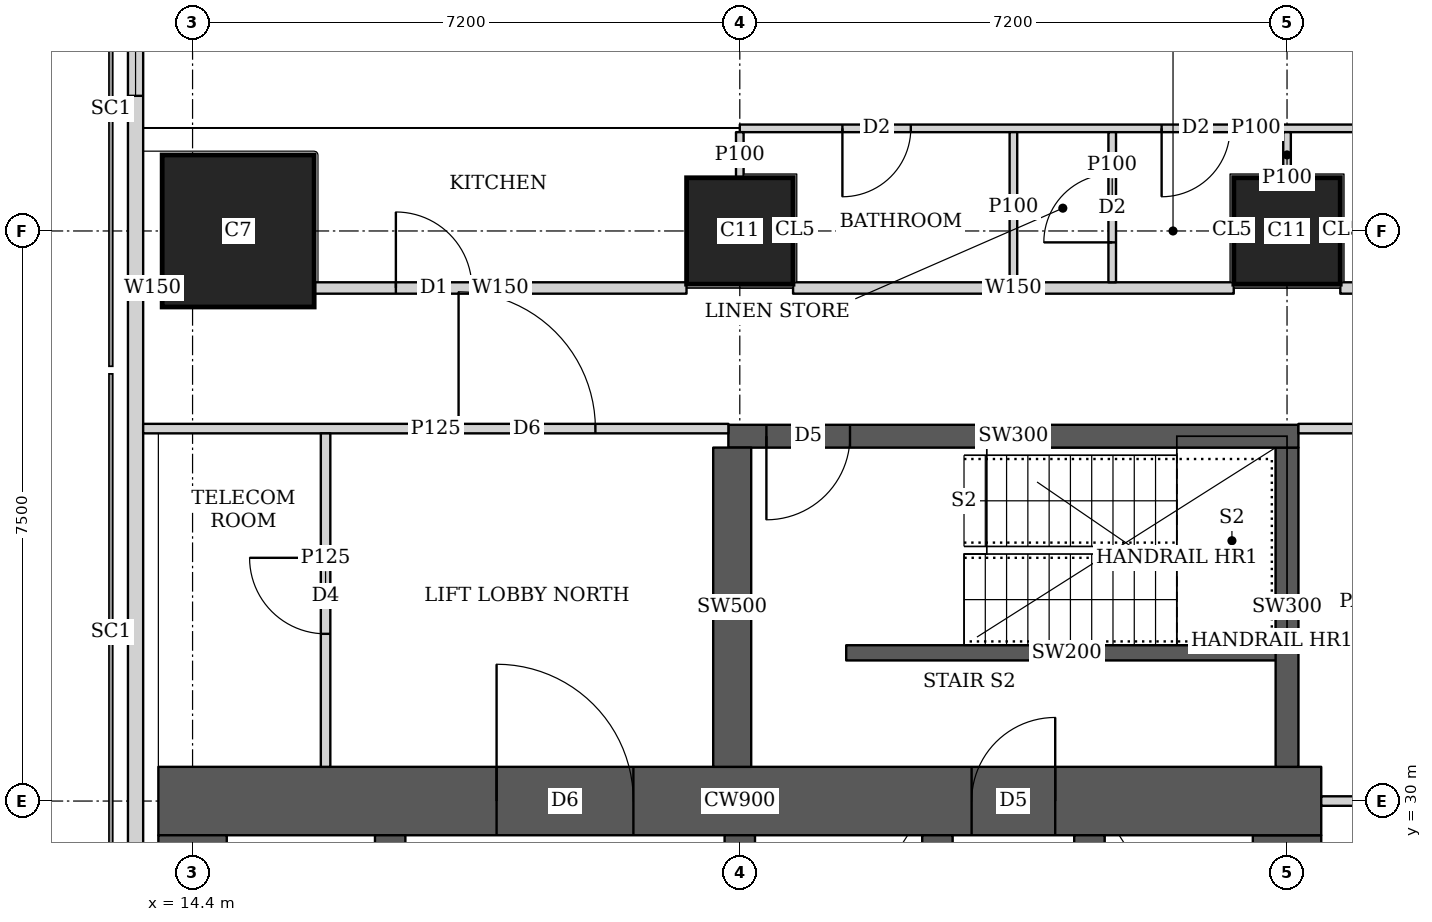
"""IFC4 building model, lengths in metres.
Left out: names, types, materials, properties, quantities, classifications, styles, units other than length and angle.
Written with IfcOpenShell. Run it as: python <this file> out.ifc"""

import sys

from ifc_helpers import new_model, si_unit, direction, frame, frame_2d, origin, origin_2d, place, context, subcontext, project, spatial, rectangle, extrude, element, fill, save


model = new_model("IFC4")
c1 = context("Model", 3, precision=1e-05, world=origin(), true_north=direction((0.0, 1.0)))
c2 = subcontext(c1, "Body", "Model", "MODEL_VIEW")
j1 = project(units=[si_unit("LENGTHUNIT", "METRE"), si_unit("PLANEANGLEUNIT", "RADIAN")], contexts=[c1])
p1 = place(None, origin())
s1 = spatial("IfcSite", under=j1, at=p1, CompositionType="ELEMENT")
p2 = place(p1, origin())
s2 = spatial("IfcBuilding", under=s1, at=p2, CompositionType="ELEMENT")
p3 = place(p2, frame((0.0, 0.0, 270.35)))
s3 = spatial("IfcBuildingStorey", under=s2, at=p3, CompositionType="ELEMENT", Elevation=270.35)
p4 = place(p3, frame((15.0, 37.5, 0.0), z_axis=(0.0, 0.0, 1.0), x_axis=(1.0, 0.0, 0.0)))
e1 = element("IfcColumn", 1, at=p4, inside=s3, PredefinedType="COLUMN", context=c2, shape_type="SweptSolid", body=[
    extrude(rectangle(XDim=2.0, YDim=2.0, at=origin_2d()), origin(), (0.0, 0.0, 1.0), 3.75),
])
for number, where, z_axis, x_axis in (
    (2, (21.6, 37.5, 0.0), (0.0, 0.0, 1.0), (1.0, 0.0, 0.0)),
    (3, (28.8, 37.5, 0.0), (0.0, 0.0, 1.0), (1.0, 0.0, 0.0)),
):
    element("IfcColumn", number, at=place(p3, frame(where, z_axis=z_axis, x_axis=x_axis)), inside=s3, PredefinedType="COLUMN", context=c2, shape_type="SweptSolid", body=[
        extrude(rectangle(XDim=1.4, YDim=1.4, at=origin_2d()), origin(), (0.0, 0.0, 1.0), 3.75),
    ])
p5 = place(p3, frame((13.95, 30.0, 0.0), z_axis=(0.0, 0.0, 1.0), x_axis=(1.0, 0.0, 0.0)))
e4 = element("IfcWall", 4, at=p5, inside=s3, PredefinedType="SHEAR", context=c2, shape_type="SweptSolid", body=[
    extrude(rectangle(XDim=15.3, YDim=0.9, at=frame_2d((7.65, 0.0))), origin(), (0.0, 0.0, 1.0), 3.75),
])
p6 = place(p5, frame((4.45, 0.0, 0.0)))
e5 = element("IfcOpeningElement", 5, at=p6, cuts=e4, PredefinedType="OPENING", context=c2, shape_type="SweptSolid", body=[
    extrude(rectangle(XDim=1.8, YDim=2.1, at=frame_2d((0.9, 1.05))), frame((0.0, 0.46, 0.0), z_axis=(0.0, -1.0, 0.0), x_axis=(1.0, 0.0, 0.0)), (0.0, 0.0, 1.0), 0.92),
])
p7 = place(p5, frame((10.7, 0.0, 0.0)))
e6 = element("IfcOpeningElement", 6, at=p7, cuts=e4, PredefinedType="OPENING", context=c2, shape_type="SweptSolid", body=[
    extrude(rectangle(XDim=1.1, YDim=2.1, at=frame_2d((0.55, 1.05))), frame((0.0, 0.46, 0.0), z_axis=(0.0, -1.0, 0.0), x_axis=(1.0, 0.0, 0.0)), (0.0, 0.0, 1.0), 0.92),
])
for number, where, z_axis, x_axis in (
    (7, (14.4, 15.45, 0.0), (0.0, 0.0, 1.0), (0.0, 1.0, 0.0)),
    (8, (28.8, 15.45, 0.0), (0.0, 0.0, 1.0), (0.0, 1.0, 0.0)),
):
    element("IfcWall", number, at=place(p3, frame(where, z_axis=z_axis, x_axis=x_axis)), inside=s3, PredefinedType="SHEAR", context=c2, shape_type="SweptSolid", body=[
        extrude(rectangle(XDim=14.1, YDim=0.9, at=frame_2d((7.05, 0.0))), origin(), (0.0, 0.0, 1.0), 3.75),
    ])
p8 = place(p3, frame((17.0, 15.45, 0.0), z_axis=(0.0, 0.0, 1.0), x_axis=(0.0, 1.0, 0.0)))
e9 = element("IfcWall", 9, at=p8, inside=s3, PredefinedType="SHEAR", context=c2, shape_type="SweptSolid", body=[
    extrude(rectangle(XDim=14.1, YDim=0.4, at=frame_2d((7.05, 0.0))), origin(), (0.0, 0.0, 1.0), 3.75),
])
p9 = place(p8, frame((1.05, 0.0, 0.0)))
e10 = element("IfcOpeningElement", 10, at=p9, cuts=e9, PredefinedType="OPENING", context=c2, shape_type="SweptSolid", body=[
    extrude(rectangle(XDim=1.0, YDim=2.1, at=frame_2d((0.5, 1.05))), frame((0.0, 0.21, 0.0), z_axis=(0.0, -1.0, 0.0), x_axis=(1.0, 0.0, 0.0)), (0.0, 0.0, 1.0), 0.42),
])
p10 = place(p8, frame((4.675, 0.0, 0.0)))
e11 = element("IfcOpeningElement", 11, at=p10, cuts=e9, PredefinedType="OPENING", context=c2, shape_type="SweptSolid", body=[
    extrude(rectangle(XDim=1.0, YDim=2.1, at=frame_2d((0.5, 1.05))), frame((0.0, 0.21, 0.0), z_axis=(0.0, -1.0, 0.0), x_axis=(1.0, 0.0, 0.0)), (0.0, 0.0, 1.0), 0.42),
])
p11 = place(p8, frame((8.425, 0.0, 0.0)))
e12 = element("IfcOpeningElement", 12, at=p11, cuts=e9, PredefinedType="OPENING", context=c2, shape_type="SweptSolid", body=[
    extrude(rectangle(XDim=1.0, YDim=2.1, at=frame_2d((0.5, 1.05))), frame((0.0, 0.21, 0.0), z_axis=(0.0, -1.0, 0.0), x_axis=(1.0, 0.0, 0.0)), (0.0, 0.0, 1.0), 0.42),
])
p12 = place(p8, frame((12.175, 0.0, 0.0)))
e13 = element("IfcOpeningElement", 13, at=p12, cuts=e9, PredefinedType="OPENING", context=c2, shape_type="SweptSolid", body=[
    extrude(rectangle(XDim=1.0, YDim=2.1, at=frame_2d((0.5, 1.05))), frame((0.0, 0.21, 0.0), z_axis=(0.0, -1.0, 0.0), x_axis=(1.0, 0.0, 0.0)), (0.0, 0.0, 1.0), 0.42),
])
p13 = place(p3, frame((21.6, 15.45, 0.0), z_axis=(0.0, 0.0, 1.0), x_axis=(0.0, 1.0, 0.0)))
e14 = element("IfcWall", 14, at=p13, inside=s3, PredefinedType="SHEAR", context=c2, shape_type="SweptSolid", body=[
    extrude(rectangle(XDim=14.1, YDim=0.4, at=frame_2d((7.05, 0.0))), origin(), (0.0, 0.0, 1.0), 3.75),
])
p14 = place(p13, frame((0.875, 0.0, 0.0)))
e15 = element("IfcOpeningElement", 15, at=p14, cuts=e14, PredefinedType="OPENING", context=c2, shape_type="SweptSolid", body=[
    extrude(rectangle(XDim=1.1, YDim=2.1, at=frame_2d((0.55, 1.05))), frame((0.0, 0.21, 0.0), z_axis=(0.0, -1.0, 0.0), x_axis=(1.0, 0.0, 0.0)), (0.0, 0.0, 1.0), 0.42),
])
p15 = place(p13, frame((4.625, 0.0, 0.0)))
e16 = element("IfcOpeningElement", 16, at=p15, cuts=e14, PredefinedType="OPENING", context=c2, shape_type="SweptSolid", body=[
    extrude(rectangle(XDim=1.1, YDim=2.1, at=frame_2d((0.55, 1.05))), frame((0.0, 0.21, 0.0), z_axis=(0.0, -1.0, 0.0), x_axis=(1.0, 0.0, 0.0)), (0.0, 0.0, 1.0), 0.42),
])
p16 = place(p13, frame((8.375, 0.0, 0.0)))
e17 = element("IfcOpeningElement", 17, at=p16, cuts=e14, PredefinedType="OPENING", context=c2, shape_type="SweptSolid", body=[
    extrude(rectangle(XDim=1.1, YDim=2.1, at=frame_2d((0.55, 1.05))), frame((0.0, 0.21, 0.0), z_axis=(0.0, -1.0, 0.0), x_axis=(1.0, 0.0, 0.0)), (0.0, 0.0, 1.0), 0.42),
])
p17 = place(p13, frame((12.125, 0.0, 0.0)))
e18 = element("IfcOpeningElement", 18, at=p17, cuts=e14, PredefinedType="OPENING", context=c2, shape_type="SweptSolid", body=[
    extrude(rectangle(XDim=1.1, YDim=2.1, at=frame_2d((0.55, 1.05))), frame((0.0, 0.21, 0.0), z_axis=(0.0, -1.0, 0.0), x_axis=(1.0, 0.0, 0.0)), (0.0, 0.0, 1.0), 0.42),
])
p18 = place(p3, frame((24.2, 15.45, 0.0), z_axis=(0.0, 0.0, 1.0), x_axis=(0.0, 1.0, 0.0)))
e19 = element("IfcWall", 19, at=p18, inside=s3, PredefinedType="SHEAR", context=c2, shape_type="SweptSolid", body=[
    extrude(rectangle(XDim=14.1, YDim=0.4, at=frame_2d((7.05, 0.0))), origin(), (0.0, 0.0, 1.0), 3.75),
])
p19 = place(p3, frame((26.2, 26.45, 0.0), z_axis=(0.0, 0.0, 1.0), x_axis=(0.0, 1.0, 0.0)))
e20 = element("IfcWall", 20, at=p19, inside=s3, PredefinedType="SHEAR", context=c2, shape_type="SweptSolid", body=[
    extrude(rectangle(XDim=3.1, YDim=0.4, at=frame_2d((1.55, 0.0))), origin(), (0.0, 0.0, 1.0), 3.75),
])
p20 = place(p19, frame((1.075, 0.0, 0.0)))
e21 = element("IfcOpeningElement", 21, at=p20, cuts=e20, PredefinedType="OPENING", context=c2, shape_type="SweptSolid", body=[
    extrude(rectangle(XDim=1.2, YDim=2.1, at=frame_2d((0.6, 1.05))), frame((0.0, 0.21, 0.0), z_axis=(0.0, -1.0, 0.0), x_axis=(1.0, 0.0, 0.0)), (0.0, 0.0, 1.0), 0.42),
])
p21 = place(p3, frame((21.45, 34.8, 0.0), z_axis=(0.0, 0.0, 1.0), x_axis=(1.0, 0.0, 0.0)))
e22 = element("IfcWall", 22, at=p21, inside=s3, PredefinedType="SHEAR", context=c2, shape_type="SweptSolid", body=[
    extrude(rectangle(XDim=7.5, YDim=0.3, at=frame_2d((3.75, 0.0))), origin(), (0.0, 0.0, 1.0), 3.75),
])
p22 = place(p21, frame((0.5, 0.0, 0.0)))
e23 = element("IfcOpeningElement", 23, at=p22, cuts=e22, PredefinedType="OPENING", context=c2, shape_type="SweptSolid", body=[
    extrude(rectangle(XDim=1.1, YDim=2.1, at=frame_2d((0.55, 1.05))), frame((0.0, 0.16, 0.0), z_axis=(0.0, -1.0, 0.0), x_axis=(1.0, 0.0, 0.0)), (0.0, 0.0, 1.0), 0.32),
])
p23 = place(p3, frame((21.5, 30.45, 0.0), z_axis=(0.0, 0.0, 1.0), x_axis=(0.0, 1.0, 0.0)))
e24 = element("IfcWall", 24, at=p23, inside=s3, PredefinedType="SHEAR", context=c2, shape_type="SweptSolid", body=[
    extrude(rectangle(XDim=4.2, YDim=0.5, at=frame_2d((2.1, 0.0))), origin(), (0.0, 0.0, 1.0), 3.75),
])
p24 = place(p3, frame((28.8, 30.45, 0.0), z_axis=(0.0, 0.0, 1.0), x_axis=(0.0, 1.0, 0.0)))
e25 = element("IfcWall", 25, at=p24, inside=s3, PredefinedType="SHEAR", context=c2, shape_type="SweptSolid", body=[
    extrude(rectangle(XDim=4.2, YDim=0.3, at=frame_2d((2.1, 0.0))), origin(), (0.0, 0.0, 1.0), 3.75),
])
p25 = place(p3, frame((13.65, 43.037, 0.0), z_axis=(0.0, 0.0, 1.0), x_axis=(0.0, -1.0, 0.0)))
e26 = element("IfcWall", 26, at=p25, inside=s3, PredefinedType="SOLIDWALL", context=c2, shape_type="SweptSolid", body=[
    extrude(rectangle(XDim=35.374, YDim=0.2, at=frame_2d((17.687, 0.0))), origin(), (0.0, 0.0, 1.0), 3.5),
])
p26 = place(p25, frame((1.959, 0.0, 0.9)))
e27 = element("IfcOpeningElement", 27, at=p26, cuts=e26, PredefinedType="OPENING", context=c2, shape_type="SweptSolid", body=[
    extrude(rectangle(XDim=1.8, YDim=1.5, at=frame_2d((0.9, 0.75))), frame((0.0, 0.11, 0.0), z_axis=(0.0, -1.0, 0.0), x_axis=(1.0, 0.0, 0.0)), (0.0, 0.0, 1.0), 0.22),
])
p27 = place(p3, frame((13.75, 36.75, 0.0), z_axis=(0.0, 0.0, 1.0), x_axis=(1.0, 0.0, 0.0)))
e28 = element("IfcWall", 28, at=p27, inside=s3, PredefinedType="SOLIDWALL", context=c2, shape_type="SweptSolid", body=[
    extrude(rectangle(XDim=0.249, YDim=0.15, at=frame_2d((0.125, 0.0))), origin(), (0.0, 0.0, 1.0), 3.5),
])
p28 = place(p3, frame((16.001, 36.75, 0.0), z_axis=(0.0, 0.0, 1.0), x_axis=(1.0, 0.0, 0.0)))
e29 = element("IfcWall", 29, at=p28, inside=s3, PredefinedType="SOLIDWALL", context=c2, shape_type="SweptSolid", body=[
    extrude(rectangle(XDim=4.898, YDim=0.15, at=frame_2d((2.449, 0.0))), origin(), (0.0, 0.0, 1.0), 3.5),
])
p29 = place(p28, frame((1.074, 0.0, 0.0)))
e30 = element("IfcOpeningElement", 30, at=p29, cuts=e29, PredefinedType="OPENING", context=c2, shape_type="SweptSolid", body=[
    extrude(rectangle(XDim=1.0, YDim=2.1, at=frame_2d((0.5, 1.05))), frame((0.0, 0.085, 0.0), z_axis=(0.0, -1.0, 0.0), x_axis=(1.0, 0.0, 0.0)), (0.0, 0.0, 1.0), 0.17),
])
p30 = place(p3, frame((22.301, 36.75, 0.0), z_axis=(0.0, 0.0, 1.0), x_axis=(1.0, 0.0, 0.0)))
e31 = element("IfcWall", 31, at=p30, inside=s3, PredefinedType="SOLIDWALL", context=c2, shape_type="SweptSolid", body=[
    extrude(rectangle(XDim=5.798, YDim=0.15, at=frame_2d((2.899, 0.0))), origin(), (0.0, 0.0, 1.0), 3.5),
])
p31 = place(p3, frame((29.501, 36.75, 0.0), z_axis=(0.0, 0.0, 1.0), x_axis=(1.0, 0.0, 0.0)))
e32 = element("IfcWall", 32, at=p31, inside=s3, PredefinedType="SOLIDWALL", context=c2, shape_type="SweptSolid", body=[
    extrude(rectangle(XDim=5.471, YDim=0.15, at=frame_2d((2.735, 0.0))), origin(), (0.0, 0.0, 1.0), 3.5),
])
p32 = place(p3, frame((21.6, 38.85, 0.0), z_axis=(0.0, 0.0, 1.0), x_axis=(1.0, 0.0, 0.0)))
e33 = element("IfcWall", 33, at=p32, inside=s3, PredefinedType="PARTITIONING", context=c2, shape_type="SweptSolid", body=[
    extrude(rectangle(XDim=12.981, YDim=0.1, at=frame_2d((6.49, 0.0))), origin(), (0.0, 0.0, 1.0), 3.5),
])
p33 = place(p32, frame((1.35, 0.0, 0.0)))
e34 = element("IfcOpeningElement", 34, at=p33, cuts=e33, PredefinedType="OPENING", context=c2, shape_type="SweptSolid", body=[
    extrude(rectangle(XDim=0.9, YDim=2.1, at=frame_2d((0.45, 1.05))), frame((0.0, 0.06, 0.0), z_axis=(0.0, -1.0, 0.0), x_axis=(1.0, 0.0, 0.0)), (0.0, 0.0, 1.0), 0.12),
])
p34 = place(p32, frame((5.55, 0.0, 0.0)))
e35 = element("IfcOpeningElement", 35, at=p34, cuts=e33, PredefinedType="OPENING", context=c2, shape_type="SweptSolid", body=[
    extrude(rectangle(XDim=0.9, YDim=2.1, at=frame_2d((0.45, 1.05))), frame((0.0, 0.06, 0.0), z_axis=(0.0, -1.0, 0.0), x_axis=(1.0, 0.0, 0.0)), (0.0, 0.0, 1.0), 0.12),
])
p35 = place(p32, frame((8.55, 0.0, 0.0)))
e36 = element("IfcOpeningElement", 36, at=p35, cuts=e33, PredefinedType="OPENING", context=c2, shape_type="SweptSolid", body=[
    extrude(rectangle(XDim=0.9, YDim=2.1, at=frame_2d((0.45, 1.05))), frame((0.0, 0.06, 0.0), z_axis=(0.0, -1.0, 0.0), x_axis=(1.0, 0.0, 0.0)), (0.0, 0.0, 1.0), 0.12),
])
p36 = place(p32, frame((11.681, 0.0, 0.0)))
e37 = element("IfcOpeningElement", 37, at=p36, cuts=e33, PredefinedType="OPENING", context=c2, shape_type="SweptSolid", body=[
    extrude(rectangle(XDim=0.9, YDim=2.1, at=frame_2d((0.45, 1.05))), frame((0.0, 0.06, 0.0), z_axis=(0.0, -1.0, 0.0), x_axis=(1.0, 0.0, 0.0)), (0.0, 0.0, 1.0), 0.12),
])
p37 = place(p3, frame((21.6, 38.201, 0.0), z_axis=(0.0, 0.0, 1.0), x_axis=(0.0, 1.0, 0.0)))
e38 = element("IfcWall", 38, at=p37, inside=s3, PredefinedType="PARTITIONING", context=c2, shape_type="SweptSolid", body=[
    extrude(rectangle(XDim=0.599, YDim=0.1, at=frame_2d((0.3, 0.0))), origin(), (0.0, 0.0, 1.0), 3.5),
])
p38 = place(p3, frame((25.2, 36.825, 0.0), z_axis=(0.0, 0.0, 1.0), x_axis=(0.0, 1.0, 0.0)))
e39 = element("IfcWall", 39, at=p38, inside=s3, PredefinedType="PARTITIONING", context=c2, shape_type="SweptSolid", body=[
    extrude(rectangle(XDim=1.975, YDim=0.1, at=frame_2d((0.988, 0.0))), origin(), (0.0, 0.0, 1.0), 3.5),
])
p39 = place(p3, frame((28.8, 38.201, 0.0), z_axis=(0.0, 0.0, 1.0), x_axis=(0.0, 1.0, 0.0)))
e40 = element("IfcWall", 40, at=p39, inside=s3, PredefinedType="PARTITIONING", context=c2, shape_type="SweptSolid", body=[
    extrude(rectangle(XDim=0.599, YDim=0.1, at=frame_2d((0.3, 0.0))), origin(), (0.0, 0.0, 1.0), 3.5),
])
p40 = place(p3, frame((26.5, 36.825, 0.0), z_axis=(0.0, 0.0, 1.0), x_axis=(0.0, 1.0, 0.0)))
e41 = element("IfcWall", 41, at=p40, inside=s3, PredefinedType="PARTITIONING", context=c2, shape_type="SweptSolid", body=[
    extrude(rectangle(XDim=1.975, YDim=0.1, at=frame_2d((0.988, 0.0))), origin(), (0.0, 0.0, 1.0), 3.5),
])
p41 = place(p40, frame((0.525, 0.0, 0.0)))
e42 = element("IfcOpeningElement", 42, at=p41, cuts=e41, PredefinedType="OPENING", context=c2, shape_type="SweptSolid", body=[
    extrude(rectangle(XDim=0.9, YDim=2.1, at=frame_2d((0.45, 1.05))), frame((0.0, 0.06, 0.0), z_axis=(0.0, -1.0, 0.0), x_axis=(1.0, 0.0, 0.0)), (0.0, 0.0, 1.0), 0.12),
])
p42 = place(p3, frame((13.75, 34.9, 0.0), z_axis=(0.0, 0.0, 1.0), x_axis=(1.0, 0.0, 0.0)))
e43 = element("IfcWall", 43, at=p42, inside=s3, PredefinedType="PARTITIONING", context=c2, shape_type="SweptSolid", body=[
    extrude(rectangle(XDim=7.7, YDim=0.125, at=frame_2d((3.85, 0.0))), origin(), (0.0, 0.0, 1.0), 3.5),
])
p43 = place(p42, frame((4.15, 0.0, 0.0)))
e44 = element("IfcOpeningElement", 44, at=p43, cuts=e43, PredefinedType="OPENING", context=c2, shape_type="SweptSolid", body=[
    extrude(rectangle(XDim=1.8, YDim=2.1, at=frame_2d((0.9, 1.05))), frame((0.0, 0.073, 0.0), z_axis=(0.0, -1.0, 0.0), x_axis=(1.0, 0.0, 0.0)), (0.0, 0.0, 1.0), 0.145),
])
p44 = place(p3, frame((16.15, 30.45, 0.0), z_axis=(0.0, 0.0, 1.0), x_axis=(0.0, 1.0, 0.0)))
e45 = element("IfcWall", 45, at=p44, inside=s3, PredefinedType="PARTITIONING", context=c2, shape_type="SweptSolid", body=[
    extrude(rectangle(XDim=4.387, YDim=0.125, at=frame_2d((2.193, 0.0))), origin(), (0.0, 0.0, 1.0), 3.5),
])
p45 = place(p44, frame((1.75, 0.0, 0.0)))
e46 = element("IfcOpeningElement", 46, at=p45, cuts=e45, PredefinedType="OPENING", context=c2, shape_type="SweptSolid", body=[
    extrude(rectangle(XDim=1.0, YDim=2.1, at=frame_2d((0.5, 1.05))), frame((0.0, 0.073, 0.0), z_axis=(0.0, -1.0, 0.0), x_axis=(1.0, 0.0, 0.0)), (0.0, 0.0, 1.0), 0.145),
])
p46 = place(p3, frame((28.95, 34.9, 0.0), z_axis=(0.0, 0.0, 1.0), x_axis=(1.0, 0.0, 0.0)))
e47 = element("IfcWall", 47, at=p46, inside=s3, PredefinedType="PARTITIONING", context=c2, shape_type="SweptSolid", body=[
    extrude(rectangle(XDim=4.588, YDim=0.125, at=frame_2d((2.294, 0.0))), origin(), (0.0, 0.0, 1.0), 3.5),
])
p47 = place(p3, frame((29.25, 30.0, 0.0), z_axis=(0.0, 0.0, 1.0), x_axis=(1.0, 0.0, 0.0)))
e48 = element("IfcWall", 48, at=p47, inside=s3, PredefinedType="PARTITIONING", context=c2, shape_type="SweptSolid", body=[
    extrude(rectangle(XDim=3.049, YDim=0.125, at=frame_2d((1.524, 0.0))), origin(), (0.0, 0.0, 1.0), 3.5),
])
p48 = place(p3, frame((23.0, 31.95, 0.0), z_axis=(0.0, 0.0, 1.0), x_axis=(1.0, 0.0, 0.0)))
e49 = element("IfcWall", 49, at=p48, inside=s3, PredefinedType="SHEAR", context=c2, shape_type="SweptSolid", body=[
    extrude(rectangle(XDim=5.8, YDim=0.2, at=frame_2d((2.9, 0.0))), origin(), (0.0, 0.0, 1.0), 3.75),
])
p49 = place(p26, origin())
e50 = element("IfcWindow", 50, at=p49, inside=s3, PartitioningType="SINGLE_PANEL", PredefinedType="WINDOW", context=c2, shape_type="SweptSolid", body=[
    extrude(rectangle(XDim=1.8, YDim=1.5, at=frame_2d((0.9, 0.75))), frame((0.0, 0.03, 0.0), z_axis=(0.0, -1.0, 0.0), x_axis=(1.0, 0.0, 0.0)), (0.0, 0.0, 1.0), 0.06),
])
fill(e27, e50)
p50 = place(p33, origin())
e51 = element("IfcDoor", 51, at=p50, inside=s3, OperationType="SINGLE_SWING_RIGHT", PredefinedType="DOOR", context=c2, shape_type="SweptSolid", body=[
    extrude(rectangle(XDim=0.9, YDim=2.1, at=frame_2d((0.45, 1.05))), frame((0.0, 0.025, 0.0), z_axis=(0.0, -1.0, 0.0), x_axis=(1.0, 0.0, 0.0)), (0.0, 0.0, 1.0), 0.05),
])
fill(e34, e51)
p51 = place(p34, origin())
e52 = element("IfcDoor", 52, at=p51, inside=s3, OperationType="SINGLE_SWING_RIGHT", PredefinedType="DOOR", context=c2, shape_type="SweptSolid", body=[
    extrude(rectangle(XDim=0.9, YDim=2.1, at=frame_2d((0.45, 1.05))), frame((0.0, 0.025, 0.0), z_axis=(0.0, -1.0, 0.0), x_axis=(1.0, 0.0, 0.0)), (0.0, 0.0, 1.0), 0.05),
])
fill(e35, e52)
p52 = place(p41, origin())
e53 = element("IfcDoor", 53, at=p52, inside=s3, OperationType="SINGLE_SWING_LEFT", PredefinedType="DOOR", context=c2, shape_type="SweptSolid", body=[
    extrude(rectangle(XDim=0.9, YDim=2.1, at=frame_2d((0.45, 1.05))), frame((0.0, 0.025, 0.0), z_axis=(0.0, -1.0, 0.0), x_axis=(1.0, 0.0, 0.0)), (0.0, 0.0, 1.0), 0.05),
])
fill(e42, e53)
p53 = place(p29, origin())
e54 = element("IfcDoor", 54, at=p53, inside=s3, OperationType="SINGLE_SWING_LEFT", PredefinedType="DOOR", context=c2, shape_type="SweptSolid", body=[
    extrude(rectangle(XDim=1.0, YDim=2.1, at=frame_2d((0.5, 1.05))), frame((0.0, 0.025, 0.0), z_axis=(0.0, -1.0, 0.0), x_axis=(1.0, 0.0, 0.0)), (0.0, 0.0, 1.0), 0.05),
])
fill(e30, e54)
p54 = place(p45, origin())
e55 = element("IfcDoor", 55, at=p54, inside=s3, OperationType="SINGLE_SWING_RIGHT", PredefinedType="DOOR", context=c2, shape_type="SweptSolid", body=[
    extrude(rectangle(XDim=1.0, YDim=2.1, at=frame_2d((0.5, 1.05))), frame((0.0, 0.025, 0.0), z_axis=(0.0, -1.0, 0.0), x_axis=(1.0, 0.0, 0.0)), (0.0, 0.0, 1.0), 0.05),
])
fill(e46, e55)
p55 = place(p43, origin())
e56 = element("IfcDoor", 56, at=p55, inside=s3, OperationType="DOUBLE_DOOR_SINGLE_SWING", PredefinedType="DOOR", context=c2, shape_type="SweptSolid", body=[
    extrude(rectangle(XDim=1.8, YDim=2.1, at=frame_2d((0.9, 1.05))), frame((0.0, 0.025, 0.0), z_axis=(0.0, -1.0, 0.0), x_axis=(1.0, 0.0, 0.0)), (0.0, 0.0, 1.0), 0.05),
])
fill(e44, e56)
p56 = place(p6, origin())
e57 = element("IfcDoor", 57, at=p56, inside=s3, OperationType="DOUBLE_DOOR_SINGLE_SWING", PredefinedType="DOOR", context=c2, shape_type="SweptSolid", body=[
    extrude(rectangle(XDim=1.8, YDim=2.1, at=frame_2d((0.9, 1.05))), frame((0.0, 0.025, 0.0), z_axis=(0.0, -1.0, 0.0), x_axis=(1.0, 0.0, 0.0)), (0.0, 0.0, 1.0), 0.05),
])
fill(e5, e57)
p57 = place(p7, origin())
e58 = element("IfcDoor", 58, at=p57, inside=s3, OperationType="SINGLE_SWING_RIGHT", PredefinedType="DOOR", context=c2, shape_type="SweptSolid", body=[
    extrude(rectangle(XDim=1.1, YDim=2.1, at=frame_2d((0.55, 1.05))), frame((0.0, 0.025, 0.0), z_axis=(0.0, -1.0, 0.0), x_axis=(1.0, 0.0, 0.0)), (0.0, 0.0, 1.0), 0.05),
])
fill(e6, e58)
p58 = place(p22, origin())
e59 = element("IfcDoor", 59, at=p58, inside=s3, OperationType="SINGLE_SWING_RIGHT", PredefinedType="DOOR", context=c2, shape_type="SweptSolid", body=[
    extrude(rectangle(XDim=1.1, YDim=2.1, at=frame_2d((0.55, 1.05))), frame((0.0, 0.025, 0.0), z_axis=(0.0, -1.0, 0.0), x_axis=(1.0, 0.0, 0.0)), (0.0, 0.0, 1.0), 0.05),
])
fill(e23, e59)
save(model, sys.argv[1])
